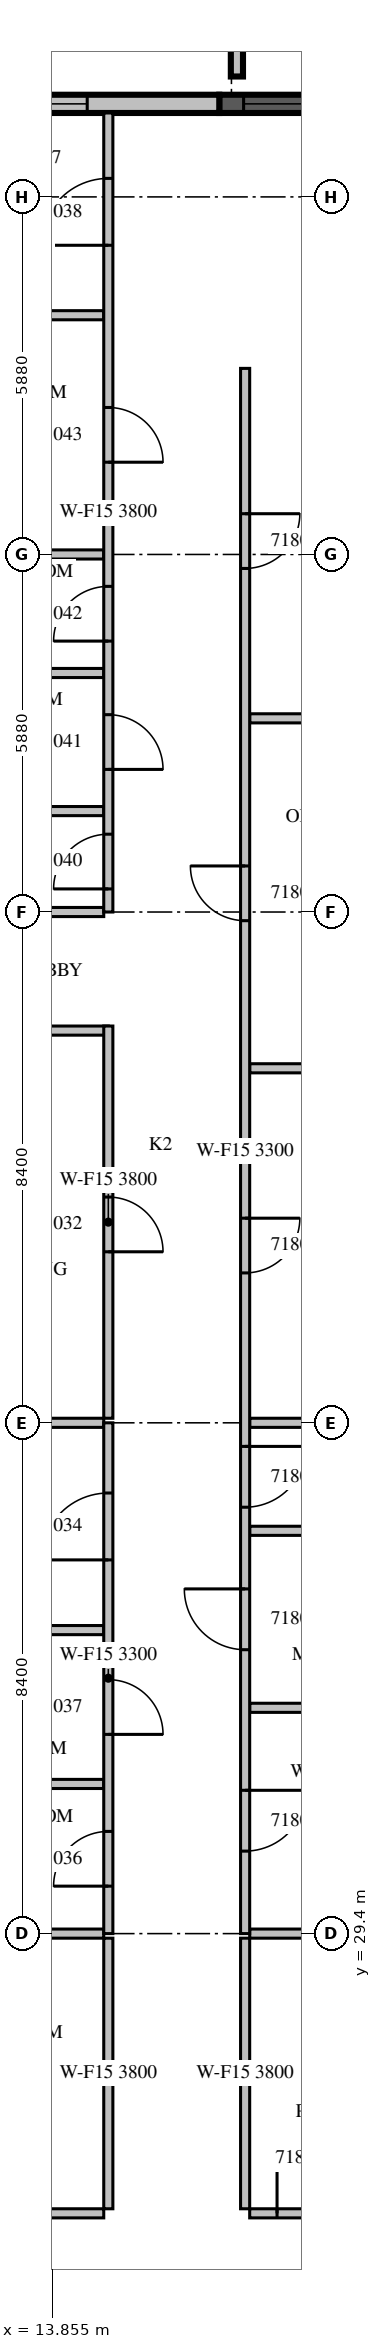
"""IFC4 building model, lengths in metres.
Left out: names, types, materials, properties, quantities, classifications, styles, units other than length and angle.
Written with IfcOpenShell. Run it as: python <this file> out.ifc"""

import sys

from ifc_helpers import new_model, si_unit, direction, frame, frame_2d, origin, place, context, subcontext, project, spatial, rectangle, extrude, source, transform, mapped, element, fill, save


model = new_model("IFC4")
c1 = context("Model", 3, precision=1e-05, world=origin(), true_north=direction((0.0, 1.0)))
c2 = subcontext(c1, "Body", "Model", "MODEL_VIEW")
j1 = project(units=[si_unit("LENGTHUNIT", "METRE"), si_unit("PLANEANGLEUNIT", "RADIAN")], contexts=[c1])
p1 = place(None, origin())
s1 = spatial("IfcSite", under=j1, at=p1, CompositionType="ELEMENT")
p2 = place(p1, origin())
s2 = spatial("IfcBuilding", under=s1, at=p2, CompositionType="ELEMENT")
p3 = place(p2, frame((0.0, 0.0, 86.7)))
s3 = spatial("IfcBuildingStorey", under=s2, at=p3, CompositionType="ELEMENT", Elevation=86.7)
m1 = source(origin(), c2, "Body", "SweptSolid", [
    extrude(rectangle(XDim=4.4, YDim=0.3, at=frame_2d((2.2, 0.0))), origin(), (0.0, 0.0, 1.0), 3.8),
])
p4 = place(p3, frame((21.0, 59.49, 0.0), z_axis=(0.0, 0.0, 1.0), x_axis=(-1.0, 0.0, 0.0)))
e1 = element("IfcWall", 1, at=p4, inside=s3, PredefinedType="SOLIDWALL", context=c2, shape_type="MappedRepresentation", body=[
    mapped(m1, transform((0.0, 0.0, 0.0), scale=1.0)),
])
m2 = source(origin(), c2, "Body", "SweptSolid", [
    extrude(rectangle(XDim=3.6, YDim=2.7, at=frame_2d((1.8, 1.35))), frame((0.0, 0.16, 0.0), z_axis=(0.0, -1.0, 0.0), x_axis=(1.0, 0.0, 0.0)), (0.0, 0.0, 1.0), 0.32),
])
p5 = place(p4, frame((0.4, 0.0, 0.6)))
e2 = element("IfcOpeningElement", 2, at=p5, cuts=e1, PredefinedType="OPENING", context=c2, shape_type="MappedRepresentation", body=[
    mapped(m2, transform((0.0, 0.0, 0.0), scale=1.0)),
])
m3 = source(origin(), c2, "Body", "SweptSolid", [
    extrude(rectangle(XDim=8.2, YDim=0.3, at=frame_2d((4.1, 0.0))), origin(), (0.0, 0.0, 1.0), 3.8),
])
p6 = place(p3, frame((16.6, 59.49, 0.0), z_axis=(0.0, 0.0, 1.0), x_axis=(-1.0, 0.0, 0.0)))
e3 = element("IfcWall", 3, at=p6, inside=s3, PredefinedType="STANDARD", context=c2, shape_type="MappedRepresentation", body=[
    mapped(m3, transform((0.0, 0.0, 0.0), scale=1.0)),
])
m4 = source(origin(), c2, "Body", "SweptSolid", [
    extrude(rectangle(XDim=1.2, YDim=2.7, at=frame_2d((0.6, 1.35))), frame((0.0, 0.16, 0.0), z_axis=(0.0, -1.0, 0.0), x_axis=(1.0, 0.0, 0.0)), (0.0, 0.0, 1.0), 0.32),
])
p7 = place(p6, frame((5.888, 0.0, 0.6)))
e4 = element("IfcOpeningElement", 4, at=p7, cuts=e3, PredefinedType="OPENING", context=c2, shape_type="MappedRepresentation", body=[
    mapped(m4, transform((0.0, 0.0, 0.0), scale=1.0)),
])
m5 = source(origin(), c2, "Body", "SweptSolid", [
    extrude(rectangle(XDim=1.8, YDim=2.7, at=frame_2d((0.9, 1.35))), frame((0.0, 0.16, 0.0), z_axis=(0.0, -1.0, 0.0), x_axis=(1.0, 0.0, 0.0)), (0.0, 0.0, 1.0), 0.32),
])
p8 = place(p6, frame((2.172, 0.0, 0.6)))
e5 = element("IfcOpeningElement", 5, at=p8, cuts=e3, PredefinedType="OPENING", context=c2, shape_type="MappedRepresentation", body=[
    mapped(m5, transform((0.0, 0.0, 0.0), scale=1.0)),
])
m6 = source(origin(), c2, "Body", "SweptSolid", [
    extrude(rectangle(XDim=1.29, YDim=0.2, at=frame_2d((0.645, 0.0))), origin(), (0.0, 0.0, 1.0), 1.1),
])
p9 = place(p3, frame((16.89, 59.94, 0.0), z_axis=(0.0, 0.0, 1.0), x_axis=(0.0, 1.0, 0.0)))
e6 = element("IfcWall", 6, at=p9, inside=s3, PredefinedType="PARAPET", context=c2, shape_type="MappedRepresentation", body=[
    mapped(m6, transform((0.0, 0.0, 0.0), scale=1.0)),
])
m7 = source(origin(), c2, "Body", "SweptSolid", [
    extrude(rectangle(XDim=11.625, YDim=0.15, at=frame_2d((5.812, 0.0))), origin(), (0.0, 0.0, 1.0), 3.8),
])
p10 = place(p3, frame((3.075, 24.8, 0.0), z_axis=(0.0, 0.0, 1.0), x_axis=(1.0, 0.0, 0.0)))
e7 = element("IfcWall", 7, at=p10, inside=s3, PredefinedType="PARTITIONING", context=c2, shape_type="MappedRepresentation", body=[
    mapped(m7, transform((0.0, 0.0, 0.0), scale=1.0)),
])
m8 = source(origin(), c2, "Body", "SweptSolid", [
    extrude(rectangle(XDim=0.9, YDim=2.1, at=frame_2d((0.45, 1.05))), frame((0.0, 0.085, 0.0), z_axis=(0.0, -1.0, 0.0), x_axis=(1.0, 0.0, 0.0)), (0.0, 0.0, 1.0), 0.17),
])
p11 = place(p10, frame((2.663, 0.0, 0.0)))
e8 = element("IfcOpeningElement", 8, at=p11, cuts=e7, PredefinedType="OPENING", context=c2, shape_type="MappedRepresentation", body=[
    mapped(m8, transform((0.0, 0.0, 0.0), scale=1.0)),
])
p12 = place(p10, frame((9.35, 0.0, 0.0)))
e9 = element("IfcOpeningElement", 9, at=p12, cuts=e7, PredefinedType="OPENING", context=c2, shape_type="MappedRepresentation", body=[
    mapped(m8, transform((0.0, 0.0, 0.0), scale=1.0)),
])
m9 = source(origin(), c2, "Body", "SweptSolid", [
    extrude(rectangle(XDim=3.6, YDim=0.15, at=frame_2d((1.8, 0.0))), origin(), (0.0, 0.0, 1.0), 3.8),
])
p13 = place(p3, frame((17.1, 24.8, 0.0), z_axis=(0.0, 0.0, 1.0), x_axis=(1.0, 0.0, 0.0)))
e10 = element("IfcWall", 10, at=p13, inside=s3, PredefinedType="PARTITIONING", context=c2, shape_type="MappedRepresentation", body=[
    mapped(m9, transform((0.0, 0.0, 0.0), scale=1.0)),
])
p14 = place(p13, frame((0.45, 0.0, 0.0)))
e11 = element("IfcOpeningElement", 11, at=p14, cuts=e10, PredefinedType="OPENING", context=c2, shape_type="MappedRepresentation", body=[
    mapped(m8, transform((0.0, 0.0, 0.0), scale=1.0)),
])
m10 = source(origin(), c2, "Body", "SweptSolid", [
    extrude(rectangle(XDim=4.45, YDim=0.15, at=frame_2d((2.225, 0.0))), origin(), (0.0, 0.0, 1.0), 3.8),
])
for number, where, z_axis, x_axis in (
    (12, (14.775, 24.875, 0.0), (0.0, 0.0, 1.0), (0.0, 1.0, 0.0)),
    (13, (17.025, 29.325, 0.0), (0.0, 0.0, 1.0), (0.0, -1.0, 0.0)),
):
    element("IfcWall", number, at=place(p3, frame(where, z_axis=z_axis, x_axis=x_axis)), inside=s3, PredefinedType="PARTITIONING", context=c2, shape_type="MappedRepresentation", body=[
        mapped(m10, transform((0.0, 0.0, 0.0), scale=1.0)),
    ])
m11 = source(origin(), c2, "Body", "SweptSolid", [
    extrude(rectangle(XDim=3.601, YDim=0.15, at=frame_2d((1.8, 0.0))), origin(), (0.0, 0.0, 1.0), 3.8),
])
p15 = place(p3, frame((14.7, 29.4, 0.0), z_axis=(0.0, 0.0, 1.0), x_axis=(-1.0, 0.0, 0.0)))
e14 = element("IfcWall", 14, at=p15, inside=s3, PredefinedType="PARTITIONING", context=c2, shape_type="MappedRepresentation", body=[
    mapped(m11, transform((0.0, 0.0, 0.0), scale=1.0)),
])
m12 = source(origin(), c2, "Body", "SweptSolid", [
    extrude(rectangle(XDim=2.701, YDim=0.15, at=frame_2d((1.351, 0.0))), origin(), (0.0, 0.0, 1.0), 3.8),
])
p16 = place(p3, frame((19.801, 29.4, 0.0), z_axis=(0.0, 0.0, 1.0), x_axis=(-1.0, 0.0, 0.0)))
e15 = element("IfcWall", 15, at=p16, inside=s3, PredefinedType="PARTITIONING", context=c2, shape_type="MappedRepresentation", body=[
    mapped(m12, transform((0.0, 0.0, 0.0), scale=1.0)),
])
m13 = source(origin(), c2, "Body", "SweptSolid", [
    extrude(rectangle(XDim=2.875, YDim=0.15, at=frame_2d((1.438, 0.0))), origin(), (0.0, 0.0, 1.0), 3.8),
])
p17 = place(p3, frame((14.775, 44.25, 0.0), z_axis=(0.0, 0.0, 1.0), x_axis=(-1.0, 0.0, 0.0)))
e16 = element("IfcWall", 16, at=p17, inside=s3, PredefinedType="PARTITIONING", context=c2, shape_type="MappedRepresentation", body=[
    mapped(m13, transform((0.0, 0.0, 0.0), scale=1.0)),
])
m14 = source(origin(), c2, "Body", "SweptSolid", [
    extrude(rectangle(XDim=6.45, YDim=0.15, at=frame_2d((3.225, 0.0))), origin(), (0.0, 0.0, 1.0), 3.8),
])
p18 = place(p3, frame((14.775, 37.875, 0.0), z_axis=(0.0, 0.0, 1.0), x_axis=(0.0, 1.0, 0.0)))
e17 = element("IfcWall", 17, at=p18, inside=s3, PredefinedType="PARTITIONING", context=c2, shape_type="MappedRepresentation", body=[
    mapped(m14, transform((0.0, 0.0, 0.0), scale=1.0)),
])
p19 = place(p18, frame((2.737, 0.0, 0.0)))
e18 = element("IfcOpeningElement", 18, at=p19, cuts=e17, PredefinedType="OPENING", context=c2, shape_type="MappedRepresentation", body=[
    mapped(m8, transform((0.0, 0.0, 0.0), scale=1.0)),
])
m15 = source(origin(), c2, "Body", "SweptSolid", [
    extrude(rectangle(XDim=3.45, YDim=0.15, at=frame_2d((1.725, 0.0))), origin(), (0.0, 0.0, 1.0), 3.8),
])
for number, where, z_axis, x_axis in (
    (19, (14.7, 31.861, 0.0), (0.0, 0.0, 1.0), (-1.0, 0.0, 0.0)),
    (20, (14.7, 34.391, 0.0), (0.0, 0.0, 1.0), (-1.0, 0.0, 0.0)),
    (21, (14.7, 37.8, 0.0), (0.0, 0.0, 1.0), (-1.0, 0.0, 0.0)),
    (22, (14.7, 47.86, 0.0), (0.0, 0.0, 1.0), (-1.0, 0.0, 0.0)),
    (23, (14.7, 50.131, 0.0), (0.0, 0.0, 1.0), (-1.0, 0.0, 0.0)),
    (24, (14.7, 52.08, 0.0), (0.0, 0.0, 1.0), (-1.0, 0.0, 0.0)),
    (25, (14.7, 56.014, 0.0), (0.0, 0.0, 1.0), (-1.0, 0.0, 0.0)),
    (26, (14.7, 46.2, 0.0), (0.0, 0.0, 1.0), (-1.0, 0.0, 0.0)),
):
    element("IfcWall", number, at=place(p3, frame(where, z_axis=z_axis, x_axis=x_axis)), inside=s3, PredefinedType="PARTITIONING", context=c2, shape_type="MappedRepresentation", body=[
        mapped(m15, transform((0.0, 0.0, 0.0), scale=1.0)),
    ])
m16 = source(origin(), c2, "Body", "SweptSolid", [
    extrude(rectangle(XDim=3.6, YDim=0.15, at=frame_2d((1.8, 0.0))), origin(), (0.0, 0.0, 1.0), 2.8),
])
for number, where, z_axis, x_axis in (
    (27, (17.1, 33.113, 0.0), (0.0, 0.0, 1.0), (1.0, 0.0, 0.0)),
    (28, (17.1, 36.024, 0.0), (0.0, 0.0, 1.0), (1.0, 0.0, 0.0)),
):
    element("IfcWall", number, at=place(p3, frame(where, z_axis=z_axis, x_axis=x_axis)), inside=s3, PredefinedType="PARTITIONING", context=c2, shape_type="MappedRepresentation", body=[
        mapped(m16, transform((0.0, 0.0, 0.0), scale=1.0)),
    ])
for number, where, z_axis, x_axis in (
    (29, (17.1, 43.63, 0.0), (0.0, 0.0, 1.0), (1.0, 0.0, 0.0)),
    (30, (17.1, 49.385, 0.0), (0.0, 0.0, 1.0), (1.0, 0.0, 0.0)),
):
    element("IfcWall", number, at=place(p3, frame(where, z_axis=z_axis, x_axis=x_axis)), inside=s3, PredefinedType="PARTITIONING", context=c2, shape_type="MappedRepresentation", body=[
        mapped(m9, transform((0.0, 0.0, 0.0), scale=1.0)),
    ])
p20 = place(p3, frame((19.801, 37.8, 0.0), z_axis=(0.0, 0.0, 1.0), x_axis=(-1.0, 0.0, 0.0)))
e31 = element("IfcWall", 31, at=p20, inside=s3, PredefinedType="PARTITIONING", context=c2, shape_type="MappedRepresentation", body=[
    mapped(m12, transform((0.0, 0.0, 0.0), scale=1.0)),
])
m17 = source(origin(), c2, "Body", "SweptSolid", [
    extrude(rectangle(XDim=8.4, YDim=0.15, at=frame_2d((4.2, 0.0))), origin(), (0.0, 0.0, 1.0), 3.3),
])
p21 = place(p3, frame((14.775, 29.4, 0.0), z_axis=(0.0, 0.0, 1.0), x_axis=(0.0, 1.0, 0.0)))
e32 = element("IfcWall", 32, at=p21, inside=s3, PredefinedType="PARTITIONING", context=c2, shape_type="MappedRepresentation", body=[
    mapped(m17, transform((0.0, 0.0, 0.0), scale=1.0)),
])
m18 = source(origin(), c2, "Body", "SweptSolid", [
    extrude(rectangle(XDim=1.1, YDim=2.1, at=frame_2d((0.55, 1.05))), frame((0.0, 0.085, 0.0), z_axis=(0.0, -1.0, 0.0), x_axis=(1.0, 0.0, 0.0)), (0.0, 0.0, 1.0), 0.17),
])
p22 = place(p21, frame((6.146, 0.0, 0.0)))
e33 = element("IfcOpeningElement", 33, at=p22, cuts=e32, PredefinedType="OPENING", context=c2, shape_type="MappedRepresentation", body=[
    mapped(m18, transform((0.0, 0.0, 0.0), scale=1.0)),
])
p23 = place(p21, frame((0.781, 0.0, 0.0)))
e34 = element("IfcOpeningElement", 34, at=p23, cuts=e32, PredefinedType="OPENING", context=c2, shape_type="MappedRepresentation", body=[
    mapped(m8, transform((0.0, 0.0, 0.0), scale=1.0)),
])
p24 = place(p21, frame((3.276, 0.0, 0.0)))
e35 = element("IfcOpeningElement", 35, at=p24, cuts=e32, PredefinedType="OPENING", context=c2, shape_type="MappedRepresentation", body=[
    mapped(m8, transform((0.0, 0.0, 0.0), scale=1.0)),
])
m19 = source(origin(), c2, "Body", "SweptSolid", [
    extrude(rectangle(XDim=13.14, YDim=0.15, at=frame_2d((6.57, 0.0))), origin(), (0.0, 0.0, 1.0), 3.8),
])
p25 = place(p3, frame((14.775, 46.2, 0.0), z_axis=(0.0, 0.0, 1.0), x_axis=(0.0, 1.0, 0.0)))
e36 = element("IfcWall", 36, at=p25, inside=s3, PredefinedType="PARTITIONING", context=c2, shape_type="MappedRepresentation", body=[
    mapped(m19, transform((0.0, 0.0, 0.0), scale=1.0)),
])
p26 = place(p25, frame((10.964, 0.0, 0.0)))
e37 = element("IfcOpeningElement", 37, at=p26, cuts=e36, PredefinedType="OPENING", context=c2, shape_type="MappedRepresentation", body=[
    mapped(m18, transform((0.0, 0.0, 0.0), scale=1.0)),
])
p27 = place(p25, frame((0.38, 0.0, 0.0)))
e38 = element("IfcOpeningElement", 38, at=p27, cuts=e36, PredefinedType="OPENING", context=c2, shape_type="MappedRepresentation", body=[
    mapped(m8, transform((0.0, 0.0, 0.0), scale=1.0)),
])
p28 = place(p25, frame((2.345, 0.0, 0.0)))
e39 = element("IfcOpeningElement", 39, at=p28, cuts=e36, PredefinedType="OPENING", context=c2, shape_type="MappedRepresentation", body=[
    mapped(m8, transform((0.0, 0.0, 0.0), scale=1.0)),
])
p29 = place(p25, frame((4.455, 0.0, 0.0)))
e40 = element("IfcOpeningElement", 40, at=p29, cuts=e36, PredefinedType="OPENING", context=c2, shape_type="MappedRepresentation", body=[
    mapped(m8, transform((0.0, 0.0, 0.0), scale=1.0)),
])
p30 = place(p25, frame((7.397, 0.0, 0.0)))
e41 = element("IfcOpeningElement", 41, at=p30, cuts=e36, PredefinedType="OPENING", context=c2, shape_type="MappedRepresentation", body=[
    mapped(m8, transform((0.0, 0.0, 0.0), scale=1.0)),
])
p31 = place(p3, frame((17.025, 55.14, 0.0), z_axis=(0.0, 0.0, 1.0), x_axis=(0.0, -1.0, 0.0)))
e42 = element("IfcWall", 42, at=p31, inside=s3, PredefinedType="PARTITIONING", context=c2, shape_type="SweptSolid", body=[
    extrude(rectangle(XDim=25.74, YDim=0.15, at=frame_2d((12.87, 0.0))), origin(), (0.0, 0.0, 1.0), 3.3),
])
m20 = source(origin(), c2, "Body", "SweptSolid", [
    extrude(rectangle(XDim=1.0, YDim=2.1, at=frame_2d((0.5, 1.05))), frame((0.0, 0.085, 0.0), z_axis=(0.0, -1.0, 0.0), x_axis=(1.0, 0.0, 0.0)), (0.0, 0.0, 1.0), 0.17),
])
p32 = place(p31, frame((23.383, 0.0, 0.0)))
e43 = element("IfcOpeningElement", 43, at=p32, cuts=e42, PredefinedType="OPENING", context=c2, shape_type="MappedRepresentation", body=[
    mapped(m20, transform((0.0, 0.0, 0.0), scale=1.0)),
])
p33 = place(p31, frame((20.071, 0.0, 0.0)))
e44 = element("IfcOpeningElement", 44, at=p33, cuts=e42, PredefinedType="OPENING", context=c2, shape_type="MappedRepresentation", body=[
    mapped(m20, transform((0.0, 0.0, 0.0), scale=1.0)),
])
p34 = place(p31, frame((17.728, 0.0, 0.0)))
e45 = element("IfcOpeningElement", 45, at=p34, cuts=e42, PredefinedType="OPENING", context=c2, shape_type="MappedRepresentation", body=[
    mapped(m20, transform((0.0, 0.0, 0.0), scale=1.0)),
])
p35 = place(p31, frame((13.975, 0.0, 0.0)))
e46 = element("IfcOpeningElement", 46, at=p35, cuts=e42, PredefinedType="OPENING", context=c2, shape_type="MappedRepresentation", body=[
    mapped(m8, transform((0.0, 0.0, 0.0), scale=1.0)),
])
p36 = place(p31, frame((8.182, 0.0, 0.0)))
e47 = element("IfcOpeningElement", 47, at=p36, cuts=e42, PredefinedType="OPENING", context=c2, shape_type="MappedRepresentation", body=[
    mapped(m8, transform((0.0, 0.0, 0.0), scale=1.0)),
])
p37 = place(p31, frame((2.39, 0.0, 0.0)))
e48 = element("IfcOpeningElement", 48, at=p37, cuts=e42, PredefinedType="OPENING", context=c2, shape_type="MappedRepresentation", body=[
    mapped(m8, transform((0.0, 0.0, 0.0), scale=1.0)),
])
m21 = source(origin(), c2, "Body", "SweptSolid", [
    extrude(rectangle(XDim=1.8, YDim=2.7, at=frame_2d((0.9, 1.35))), frame((0.0, 0.03, 0.0), z_axis=(0.0, -1.0, 0.0), x_axis=(1.0, 0.0, 0.0)), (0.0, 0.0, 1.0), 0.06),
])
p38 = place(p8, origin())
e49 = element("IfcWindow", 49, at=p38, inside=s3, PartitioningType="SINGLE_PANEL", PredefinedType="WINDOW", context=c2, shape_type="MappedRepresentation", body=[
    mapped(m21, transform((0.0, 0.0, 0.0), scale=1.0)),
])
fill(e5, e49)
m22 = source(origin(), c2, "Body", "SweptSolid", [
    extrude(rectangle(XDim=3.6, YDim=2.7, at=frame_2d((1.8, 1.35))), frame((0.0, 0.03, 0.0), z_axis=(0.0, -1.0, 0.0), x_axis=(1.0, 0.0, 0.0)), (0.0, 0.0, 1.0), 0.06),
])
p39 = place(p5, origin())
e50 = element("IfcWindow", 50, at=p39, inside=s3, PartitioningType="SINGLE_PANEL", PredefinedType="WINDOW", context=c2, shape_type="MappedRepresentation", body=[
    mapped(m22, transform((0.0, 0.0, 0.0), scale=1.0)),
])
fill(e2, e50)
m23 = source(origin(), c2, "Body", "SweptSolid", [
    extrude(rectangle(XDim=0.9, YDim=2.1, at=frame_2d((0.45, 1.05))), frame((0.0, 0.025, 0.0), z_axis=(0.0, -1.0, 0.0), x_axis=(1.0, 0.0, 0.0)), (0.0, 0.0, 1.0), 0.05),
])
p40 = place(p14, origin())
e51 = element("IfcDoor", 51, at=p40, inside=s3, OperationType="SINGLE_SWING_LEFT", PredefinedType="DOOR", context=c2, shape_type="MappedRepresentation", body=[
    mapped(m23, transform((0.0, 0.0, 0.0), scale=1.0)),
])
fill(e11, e51)
p41 = place(p19, origin())
e52 = element("IfcDoor", 52, at=p41, inside=s3, OperationType="SINGLE_SWING_RIGHT", PredefinedType="DOOR", context=c2, shape_type="MappedRepresentation", body=[
    mapped(m23, transform((0.0, 0.0, 0.0), scale=1.0)),
])
fill(e18, e52)
m24 = source(origin(), c2, "Body", "SweptSolid", [
    extrude(rectangle(XDim=1.1, YDim=2.1, at=frame_2d((0.55, 1.05))), frame((0.0, 0.025, 0.0), z_axis=(0.0, -1.0, 0.0), x_axis=(1.0, 0.0, 0.0)), (0.0, 0.0, 1.0), 0.05),
])
p42 = place(p22, origin())
e53 = element("IfcDoor", 53, at=p42, inside=s3, OperationType="SINGLE_SWING_LEFT", PredefinedType="DOOR", context=c2, shape_type="MappedRepresentation", body=[
    mapped(m24, transform((0.0, 0.0, 0.0), scale=1.0)),
])
fill(e33, e53)
p43 = place(p23, origin())
e54 = element("IfcDoor", 54, at=p43, inside=s3, OperationType="SINGLE_SWING_LEFT", PredefinedType="DOOR", context=c2, shape_type="MappedRepresentation", body=[
    mapped(m23, transform((0.0, 0.0, 0.0), scale=1.0)),
])
fill(e34, e54)
p44 = place(p24, origin())
e55 = element("IfcDoor", 55, at=p44, inside=s3, OperationType="SINGLE_SWING_RIGHT", PredefinedType="DOOR", context=c2, shape_type="MappedRepresentation", body=[
    mapped(m23, transform((0.0, 0.0, 0.0), scale=1.0)),
])
fill(e35, e55)
p45 = place(p26, origin())
e56 = element("IfcDoor", 56, at=p45, inside=s3, OperationType="SINGLE_SWING_LEFT", PredefinedType="DOOR", context=c2, shape_type="MappedRepresentation", body=[
    mapped(m24, transform((0.0, 0.0, 0.0), scale=1.0)),
])
fill(e37, e56)
p46 = place(p27, origin())
e57 = element("IfcDoor", 57, at=p46, inside=s3, OperationType="SINGLE_SWING_LEFT", PredefinedType="DOOR", context=c2, shape_type="MappedRepresentation", body=[
    mapped(m23, transform((0.0, 0.0, 0.0), scale=1.0)),
])
fill(e38, e57)
p47 = place(p28, origin())
e58 = element("IfcDoor", 58, at=p47, inside=s3, OperationType="SINGLE_SWING_RIGHT", PredefinedType="DOOR", context=c2, shape_type="MappedRepresentation", body=[
    mapped(m23, transform((0.0, 0.0, 0.0), scale=1.0)),
])
fill(e39, e58)
p48 = place(p29, origin())
e59 = element("IfcDoor", 59, at=p48, inside=s3, OperationType="SINGLE_SWING_LEFT", PredefinedType="DOOR", context=c2, shape_type="MappedRepresentation", body=[
    mapped(m23, transform((0.0, 0.0, 0.0), scale=1.0)),
])
fill(e40, e59)
p49 = place(p30, origin())
e60 = element("IfcDoor", 60, at=p49, inside=s3, OperationType="SINGLE_SWING_RIGHT", PredefinedType="DOOR", context=c2, shape_type="MappedRepresentation", body=[
    mapped(m23, transform((0.0, 0.0, 0.0), scale=1.0)),
])
fill(e41, e60)
m25 = source(origin(), c2, "Body", "SweptSolid", [
    extrude(rectangle(XDim=1.0, YDim=2.1, at=frame_2d((0.5, 1.05))), frame((0.0, 0.025, 0.0), z_axis=(0.0, -1.0, 0.0), x_axis=(1.0, 0.0, 0.0)), (0.0, 0.0, 1.0), 0.05),
])
p50 = place(p32, origin())
e61 = element("IfcDoor", 61, at=p50, inside=s3, OperationType="SINGLE_SWING_LEFT", PredefinedType="DOOR", context=c2, shape_type="MappedRepresentation", body=[
    mapped(m25, transform((0.0, 0.0, 0.0), scale=1.0)),
])
fill(e43, e61)
p51 = place(p33, origin())
e62 = element("IfcDoor", 62, at=p51, inside=s3, OperationType="SINGLE_SWING_RIGHT", PredefinedType="DOOR", context=c2, shape_type="MappedRepresentation", body=[
    mapped(m25, transform((0.0, 0.0, 0.0), scale=1.0)),
])
fill(e44, e62)
p52 = place(p34, origin())
e63 = element("IfcDoor", 63, at=p52, inside=s3, OperationType="SINGLE_SWING_LEFT", PredefinedType="DOOR", context=c2, shape_type="MappedRepresentation", body=[
    mapped(m25, transform((0.0, 0.0, 0.0), scale=1.0)),
])
fill(e45, e63)
p53 = place(p35, origin())
e64 = element("IfcDoor", 64, at=p53, inside=s3, OperationType="SINGLE_SWING_LEFT", PredefinedType="DOOR", context=c2, shape_type="MappedRepresentation", body=[
    mapped(m23, transform((0.0, 0.0, 0.0), scale=1.0)),
])
fill(e46, e64)
p54 = place(p36, origin())
e65 = element("IfcDoor", 65, at=p54, inside=s3, OperationType="SINGLE_SWING_RIGHT", PredefinedType="DOOR", context=c2, shape_type="MappedRepresentation", body=[
    mapped(m23, transform((0.0, 0.0, 0.0), scale=1.0)),
])
fill(e47, e65)
p55 = place(p37, origin())
e66 = element("IfcDoor", 66, at=p55, inside=s3, OperationType="SINGLE_SWING_LEFT", PredefinedType="DOOR", context=c2, shape_type="MappedRepresentation", body=[
    mapped(m23, transform((0.0, 0.0, 0.0), scale=1.0)),
])
fill(e48, e66)
save(model, sys.argv[1])
